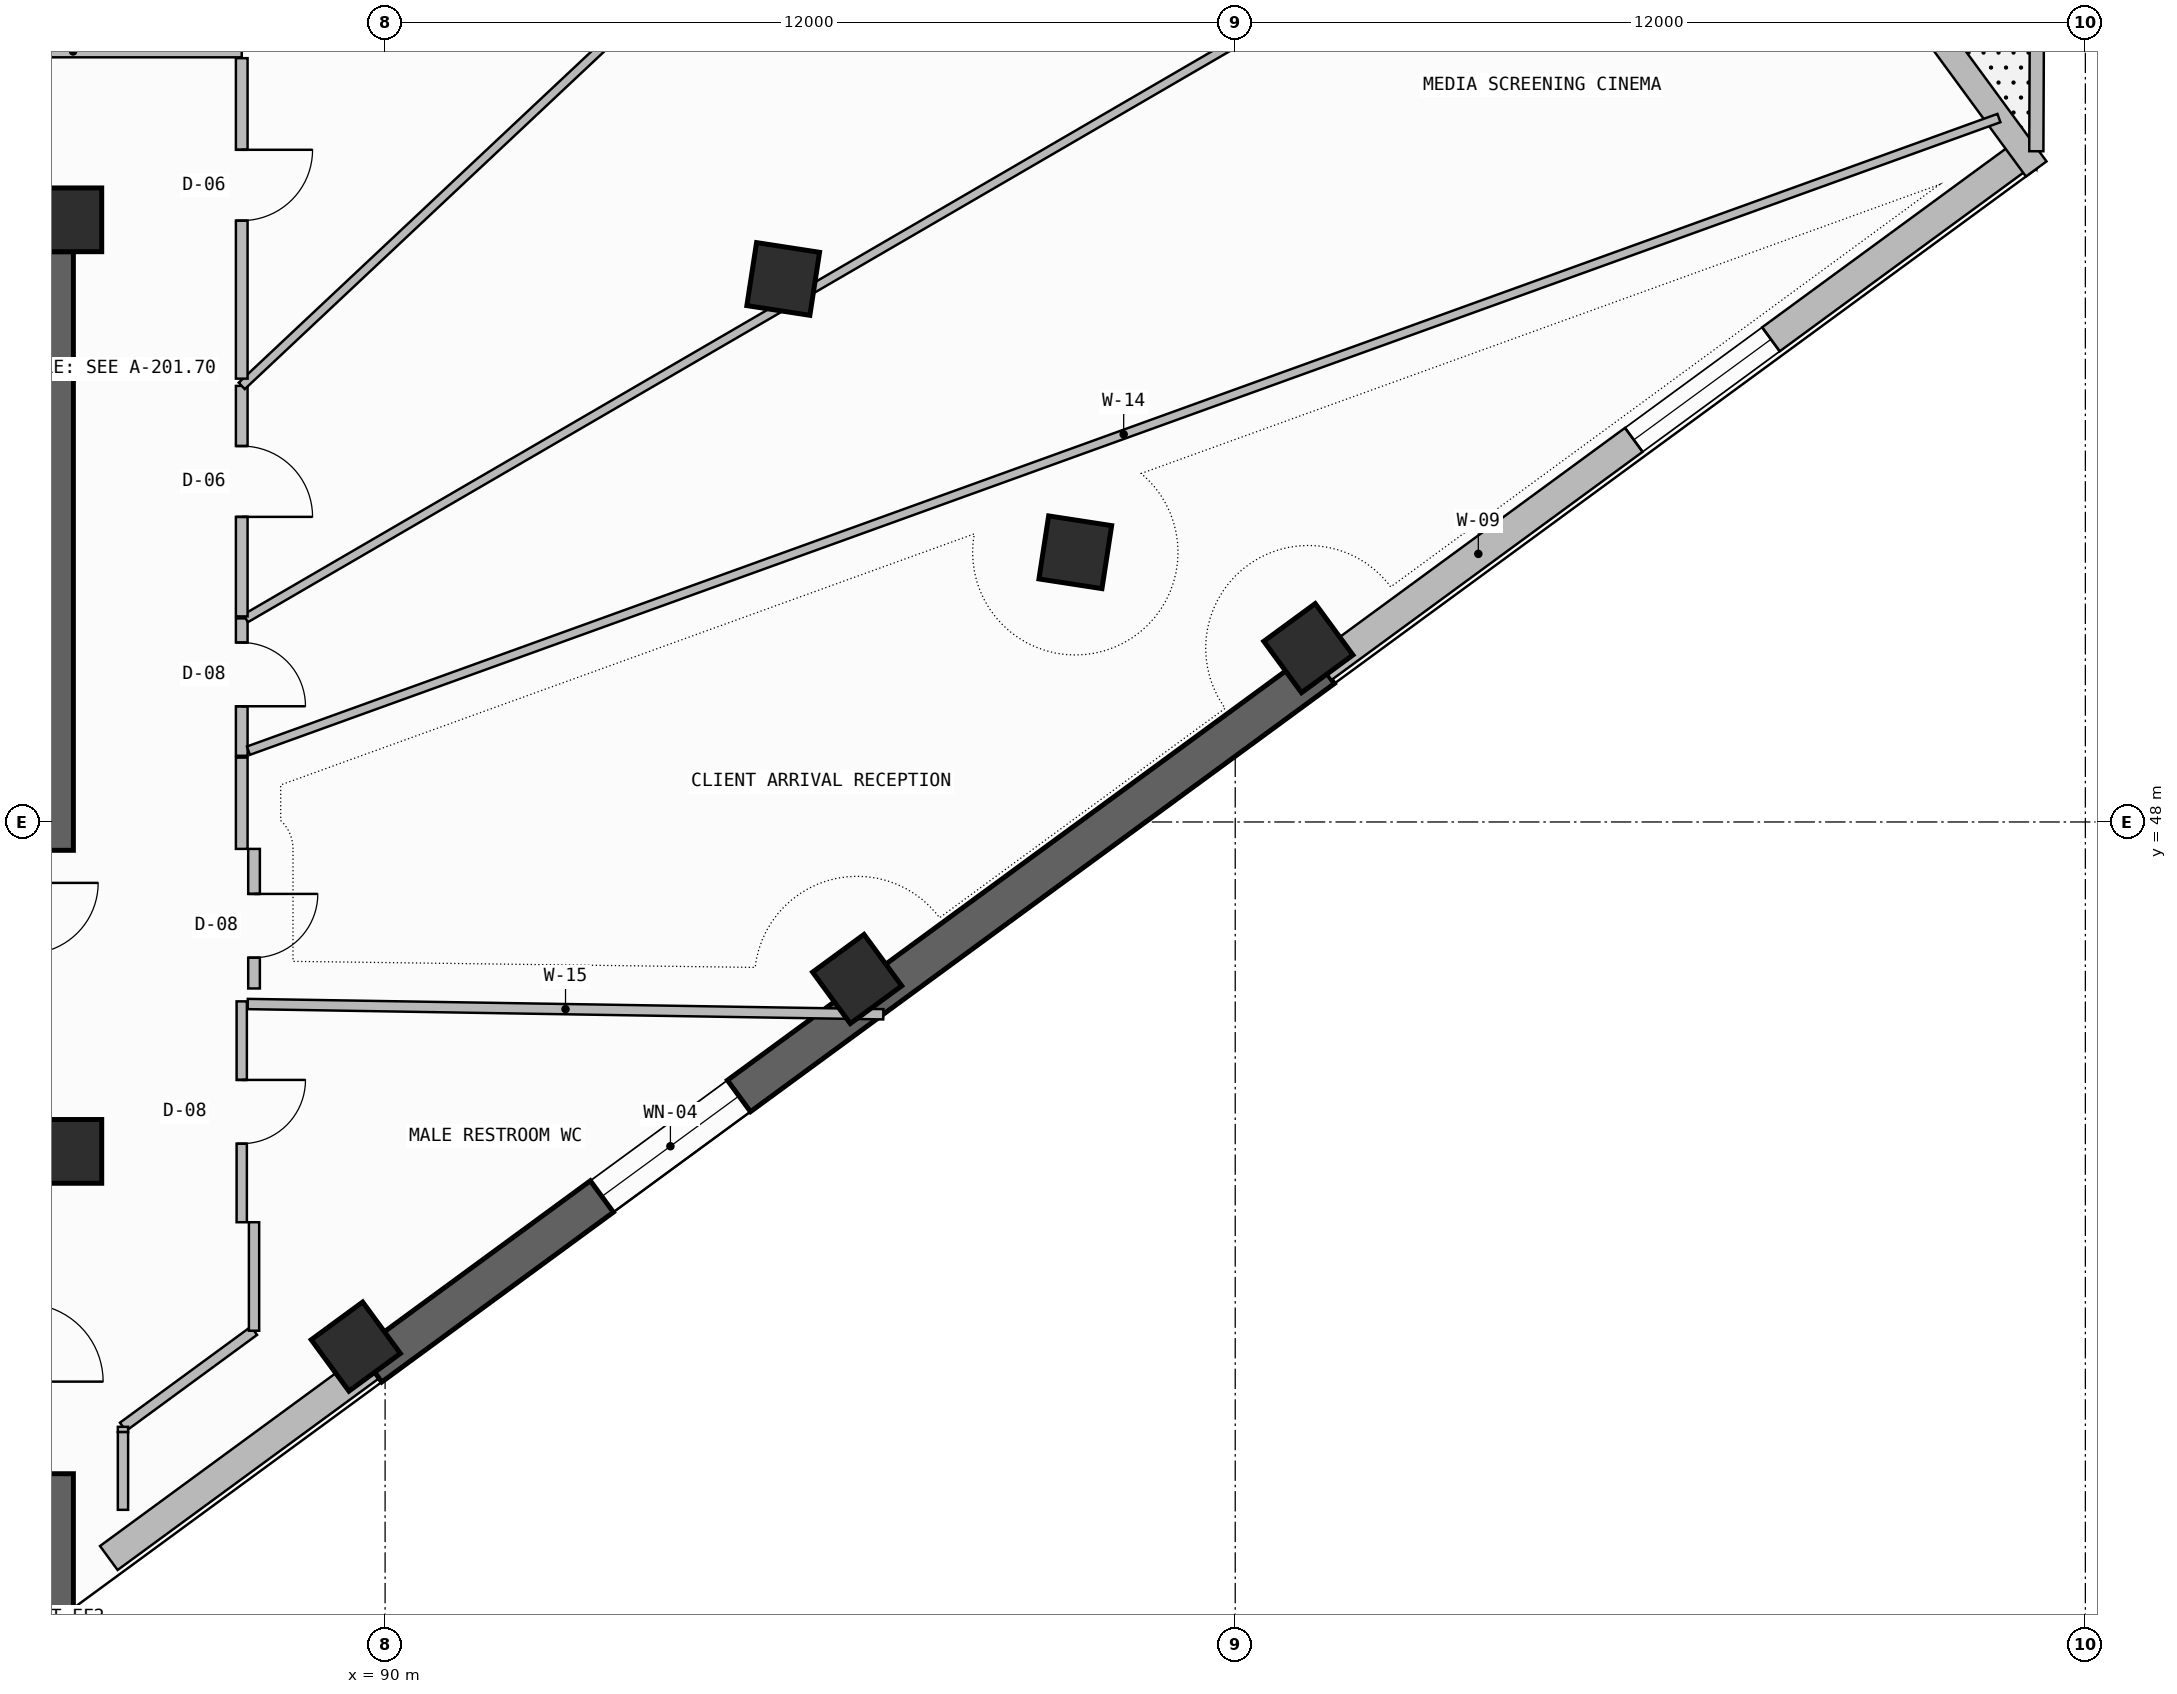
"""IFC4 building model, lengths in metres.
Left out: names, types, materials, properties, quantities, classifications, styles, units other than length and angle.
Written with IfcOpenShell. Run it as: python <this file> out.ifc"""

import sys

from ifc_helpers import new_model, si_unit, direction, frame, frame_2d, origin, origin_2d, place, context, subcontext, project, spatial, rectangle, extrude, element, fill, save


model = new_model("IFC4")
c1 = context("Model", 3, precision=1e-05, world=origin(), true_north=direction((0.0, 1.0)))
c2 = subcontext(c1, "Body", "Model", "MODEL_VIEW")
j1 = project(units=[si_unit("LENGTHUNIT", "METRE"), si_unit("PLANEANGLEUNIT", "RADIAN")], contexts=[c1])
p1 = place(None, origin())
s1 = spatial("IfcSite", under=j1, at=p1, CompositionType="ELEMENT")
p2 = place(p1, origin())
s2 = spatial("IfcBuilding", under=s1, at=p2, CompositionType="ELEMENT")
p3 = place(p2, frame((0.0, 0.0, 250.18)))
s3 = spatial("IfcBuildingStorey", under=s2, at=p3, CompositionType="ELEMENT", Elevation=250.18)
p4 = place(p3, frame((85.3, 35.5, -0.26), z_axis=(0.0, 0.0, 1.0), x_axis=(0.0, 1.0, 0.0)))
e1 = element("IfcWall", 1, at=p4, inside=s3, PredefinedType="SHEAR", context=c2, shape_type="SweptSolid", body=[
    extrude(rectangle(XDim=3.3, YDim=0.6, at=frame_2d((1.65, 0.0))), origin(), (0.0, 0.0, 1.0), 3.52),
])
p5 = place(p3, frame((72.0, 56.35, -0.26), z_axis=(0.0, 0.0, 1.0), x_axis=(1.0, 0.0, 0.0)))
e2 = element("IfcWall", 2, at=p5, inside=s3, PredefinedType="SHEAR", context=c2, shape_type="SweptSolid", body=[
    extrude(rectangle(XDim=13.6, YDim=0.6, at=frame_2d((6.8, 0.0))), origin(), (0.0, 0.0, 1.0), 3.52),
])
p6 = place(p3, frame((85.3, 47.6, -0.26), z_axis=(0.0, 0.0, 1.0), x_axis=(0.0, 1.0, 0.0)))
e3 = element("IfcWall", 3, at=p6, inside=s3, PredefinedType="SHEAR", context=c2, shape_type="SweptSolid", body=[
    extrude(rectangle(XDim=8.45, YDim=0.6, at=frame_2d((4.225, 0.0))), origin(), (0.0, 0.0, 1.0), 3.52),
])
for number, where, z_axis, x_axis in (
    (4, (85.55, 43.35, 0.0), (0.0, 0.0, 1.0), (1.0, 0.0, 0.0)),
    (5, (85.55, 56.5, 0.0), (0.0, 0.0, 1.0), (1.0, 0.0, 0.0)),
    (6, (89.586, 40.594, 0.0), (0.0, 0.0, 1.0), (0.806, 0.591, 0.0)),
    (7, (96.663, 45.783, 0.0), (0.0, 0.0, 1.0), (0.806, 0.591, 0.0)),
    (8, (103.032, 50.454, 0.0), (0.0, 0.0, 1.0), (0.806, 0.591, 0.0)),
    (9, (99.743, 51.807, 0.0), (0.0, 0.0, 1.0), (0.152, 0.988, 0.0)),
    (10, (95.619, 55.665, 0.0), (0.0, 0.0, 1.0), (0.152, 0.988, 0.0)),
):
    element("IfcColumn", number, at=place(p3, frame(where, z_axis=z_axis, x_axis=x_axis)), inside=s3, PredefinedType="COLUMN", context=c2, shape_type="SweptSolid", body=[
        extrude(rectangle(XDim=0.9, YDim=0.9, at=origin_2d()), origin(), (0.0, 0.0, 1.0), 3.52),
    ])
p7 = place(p3, frame((86.1, 37.61, 0.0), z_axis=(0.0, 0.0, 1.0), x_axis=(0.806432132361, 0.591326657521, 0.0)))
e11 = element("IfcWall", 11, at=p7, inside=s3, PredefinedType="SOLIDWALL", context=c2, shape_type="SweptSolid", body=[
    extrude(rectangle(XDim=4.576, YDim=0.42, at=frame_2d((2.288, 0.0))), origin(), (0.0, 0.0, 1.0), 2.245),
])
p8 = place(p3, frame((89.791, 40.316, -0.26), z_axis=(0.0, 0.0, 1.0), x_axis=(0.806449218078, 0.591303355868, 0.0)))
e12 = element("IfcWall", 12, at=p8, inside=s3, PredefinedType="SHEAR", context=c2, shape_type="SweptSolid", body=[
    extrude(rectangle(XDim=16.673, YDim=0.55, at=frame_2d((8.336, 0.0))), origin(), (0.0, 0.0, 1.0), 3.52),
])
p9 = place(p8, frame((4.054, 0.0, 1.1)))
e13 = element("IfcOpeningElement", 13, at=p9, cuts=e12, PredefinedType="OPENING", context=c2, shape_type="SweptSolid", body=[
    extrude(rectangle(XDim=2.4, YDim=1.2, at=frame_2d((1.2, 0.6))), frame((0.0, 0.285, 0.0), z_axis=(0.0, -1.0, 0.0), x_axis=(1.0, 0.0, 0.0)), (0.0, 0.0, 1.0), 0.57),
])
p10 = place(p3, frame((103.237, 50.175, 0.0), z_axis=(0.0, 0.0, 1.0), x_axis=(0.80643721533, 0.591319725471, 0.0)))
e14 = element("IfcWall", 14, at=p10, inside=s3, PredefinedType="SOLIDWALL", context=c2, shape_type="SweptSolid", body=[
    extrude(rectangle(XDim=12.285, YDim=0.42, at=frame_2d((6.143, 0.0))), origin(), (0.0, 0.0, 1.0), 2.245),
])
p11 = place(p10, frame((5.443, 0.0, 0.965)))
e15 = element("IfcOpeningElement", 15, at=p11, cuts=e14, PredefinedType="OPENING", context=c2, shape_type="SweptSolid", body=[
    extrude(rectangle(XDim=2.4, YDim=1.2, at=frame_2d((1.2, 0.6))), frame((0.0, 0.22, 0.0), z_axis=(0.0, -1.0, 0.0), x_axis=(1.0, 0.0, 0.0)), (0.0, 0.0, 1.0), 0.44),
])
p12 = place(p3, frame((113.307, 57.218, 0.0), z_axis=(0.0, 0.0, 1.0), x_axis=(-0.591251685745, 0.806487101015, 0.0)))
e16 = element("IfcWall", 16, at=p12, inside=s3, PredefinedType="SOLIDWALL", context=c2, shape_type="SweptSolid", body=[
    extrude(rectangle(XDim=2.269, YDim=0.36, at=frame_2d((1.134, 0.0))), origin(), (0.0, 0.0, 1.0), 3.26),
])
p13 = place(p3, frame((113.308, 57.468, 0.0), z_axis=(0.0, 0.0, 1.0), x_axis=(0.004415432147, 0.999990251932, 0.0)))
e17 = element("IfcWall", 17, at=p13, inside=s3, PredefinedType="PARAPET", context=c2, shape_type="SweptSolid", body=[
    extrude(rectangle(XDim=2.322, YDim=0.2, at=frame_2d((1.161, 0.0))), origin(), (0.0, 0.0, 1.0), 1.15),
])
p14 = place(p3, frame((87.976, 42.35, 0.0), z_axis=(0.0, 0.0, 1.0), x_axis=(0.0, 1.0, 0.0)))
e18 = element("IfcWall", 18, at=p14, inside=s3, PredefinedType="PARTITIONING", context=c2, shape_type="SweptSolid", body=[
    extrude(rectangle(XDim=3.118, YDim=0.145, at=frame_2d((1.559, 0.0))), origin(), (0.0, 0.0, 1.0), 2.745),
])
p15 = place(p14, frame((1.109, 0.0, 0.0)))
e19 = element("IfcOpeningElement", 19, at=p15, cuts=e18, PredefinedType="OPENING", context=c2, shape_type="SweptSolid", body=[
    extrude(rectangle(XDim=0.9, YDim=2.1, at=frame_2d((0.45, 1.05))), frame((0.0, 0.083, 0.0), z_axis=(0.0, -1.0, 0.0), x_axis=(1.0, 0.0, 0.0)), (0.0, 0.0, 1.0), 0.165),
])
p16 = place(p3, frame((86.3, 39.462, 0.0), z_axis=(0.0, 0.0, 1.0), x_axis=(0.80642868075, 0.591331364689, 0.0)))
e20 = element("IfcWall", 20, at=p16, inside=s3, PredefinedType="PARTITIONING", context=c2, shape_type="SweptSolid", body=[
    extrude(rectangle(XDim=2.294, YDim=0.145, at=frame_2d((1.147, 0.0))), origin(), (0.0, 0.0, 1.0), 3.26),
])
p17 = place(p3, frame((88.15, 40.818, 0.0), z_axis=(0.0, 0.0, 1.0), x_axis=(0.0, 1.0, 0.0)))
e21 = element("IfcWall", 21, at=p17, inside=s3, PredefinedType="PARTITIONING", context=c2, shape_type="SweptSolid", body=[
    extrude(rectangle(XDim=1.532, YDim=0.145, at=frame_2d((0.766, 0.0))), origin(), (0.0, 0.0, 1.0), 2.745),
])
p18 = place(p3, frame((86.3, 39.388, 0.0), z_axis=(0.0, 0.0, 1.0), x_axis=(0.0, 1.0, 0.0)))
e22 = element("IfcWall", 22, at=p18, inside=s3, PredefinedType="PARTITIONING", context=c2, shape_type="SweptSolid", body=[
    extrude(rectangle(XDim=0.074, YDim=0.145, at=frame_2d((0.037, 0.0))), origin(), (0.0, 0.0, 1.0), 3.26),
])
p19 = place(p3, frame((88.061, 45.43, 0.0), z_axis=(0.0, 0.0, 1.0), x_axis=(0.99986939291, -0.01616159404, 0.0)))
e23 = element("IfcWall", 23, at=p19, inside=s3, PredefinedType="PARTITIONING", context=c2, shape_type="SweptSolid", body=[
    extrude(rectangle(XDim=8.973, YDim=0.145, at=frame_2d((4.487, 0.0))), origin(), (0.0, 0.0, 1.0), 2.245),
])
p20 = place(p3, frame((87.976, 48.934, 0.0), z_axis=(0.0, 0.0, 1.0), x_axis=(0.0, 1.0, 0.0)))
e24 = element("IfcWall", 24, at=p20, inside=s3, PredefinedType="PARTITIONING", context=c2, shape_type="SweptSolid", body=[
    extrude(rectangle(XDim=1.94, YDim=0.165, at=frame_2d((0.97, 0.0))), origin(), (0.0, 0.0, 1.0), 3.26),
])
p21 = place(p20, frame((0.699, 0.0, 0.0)))
e25 = element("IfcOpeningElement", 25, at=p21, cuts=e24, PredefinedType="OPENING", context=c2, shape_type="SweptSolid", body=[
    extrude(rectangle(XDim=0.9, YDim=2.1, at=frame_2d((0.45, 1.05))), frame((0.0, 0.093, 0.0), z_axis=(0.0, -1.0, 0.0), x_axis=(1.0, 0.0, 0.0)), (0.0, 0.0, 1.0), 0.185),
])
p22 = place(p3, frame((112.78, 57.937, 0.0), z_axis=(0.0, 0.0, 1.0), x_axis=(-0.940468773031, -0.339880106734, 0.0)))
e26 = element("IfcWall", 26, at=p22, inside=s3, PredefinedType="PARTITIONING", context=c2, shape_type="SweptSolid", body=[
    extrude(rectangle(XDim=26.273, YDim=0.125, at=frame_2d((13.136, 0.0))), origin(), (0.0, 0.0, 1.0), 2.645),
])
p23 = place(p3, frame((88.032, 50.874, 0.0), z_axis=(0.0, 0.0, 1.0), x_axis=(0.864436485223, 0.502742044209, 0.0)))
e27 = element("IfcWall", 27, at=p23, inside=s3, PredefinedType="PARTITIONING", context=c2, shape_type="SweptSolid", body=[
    extrude(rectangle(XDim=20.485, YDim=0.125, at=frame_2d((10.243, 0.0))), origin(), (0.0, 0.0, 1.0), 2.645),
])
p24 = place(p3, frame((88.15, 45.65, 0.0), z_axis=(0.0, 0.0, 1.0), x_axis=(0.0, 1.0, 0.0)))
e28 = element("IfcWall", 28, at=p24, inside=s3, PredefinedType="PARTITIONING", context=c2, shape_type="SweptSolid", body=[
    extrude(rectangle(XDim=1.97, YDim=0.165, at=frame_2d((0.985, 0.0))), origin(), (0.0, 0.0, 1.0), 3.26),
])
p25 = place(p24, frame((0.435, 0.0, 0.0)))
e29 = element("IfcOpeningElement", 29, at=p25, cuts=e28, PredefinedType="OPENING", context=c2, shape_type="SweptSolid", body=[
    extrude(rectangle(XDim=0.9, YDim=2.1, at=frame_2d((0.45, 1.05))), frame((0.0, 0.093, 0.0), z_axis=(0.0, -1.0, 0.0), x_axis=(1.0, 0.0, 0.0)), (0.0, 0.0, 1.0), 0.185),
])
p26 = place(p3, frame((87.976, 47.62, 0.0), z_axis=(0.0, 0.0, 1.0), x_axis=(0.0, 1.0, 0.0)))
e30 = element("IfcWall", 30, at=p26, inside=s3, PredefinedType="PARTITIONING", context=c2, shape_type="SweptSolid", body=[
    extrude(rectangle(XDim=1.289, YDim=0.165, at=frame_2d((0.644, 0.0))), origin(), (0.0, 0.0, 1.0), 3.26),
])
p27 = place(p3, frame((87.976, 50.902, 0.0), z_axis=(0.0, 0.0, 1.0), x_axis=(0.0, 1.0, 0.0)))
e31 = element("IfcWall", 31, at=p27, inside=s3, PredefinedType="PARTITIONING", context=c2, shape_type="SweptSolid", body=[
    extrude(rectangle(XDim=3.254, YDim=0.165, at=frame_2d((1.627, 0.0))), origin(), (0.0, 0.0, 1.0), 3.26),
])
p28 = place(p27, frame((1.405, 0.0, 0.0)))
e32 = element("IfcOpeningElement", 32, at=p28, cuts=e31, PredefinedType="OPENING", context=c2, shape_type="SweptSolid", body=[
    extrude(rectangle(XDim=1.0, YDim=2.2, at=frame_2d((0.5, 1.1))), frame((0.0, 0.093, 0.0), z_axis=(0.0, -1.0, 0.0), x_axis=(1.0, 0.0, 0.0)), (0.0, 0.0, 1.0), 0.185),
])
p29 = place(p3, frame((87.976, 54.156, 0.0), z_axis=(0.0, 0.0, 1.0), x_axis=(0.72887582032, 0.68464592203, 0.0)))
e33 = element("IfcWall", 33, at=p29, inside=s3, PredefinedType="PARTITIONING", context=c2, shape_type="SweptSolid", body=[
    extrude(rectangle(XDim=11.575, YDim=0.125, at=frame_2d((5.788, 0.0))), origin(), (0.0, 0.0, 1.0), 2.645),
])
p30 = place(p3, frame((87.976, 58.876, 0.0), z_axis=(0.0, 0.0, 1.0), x_axis=(-1.0, 0.0, 0.0)))
e34 = element("IfcWall", 34, at=p30, inside=s3, PredefinedType="PARTITIONING", context=c2, shape_type="SweptSolid", body=[
    extrude(rectangle(XDim=4.76, YDim=0.165, at=frame_2d((2.38, 0.0))), origin(), (0.0, 0.0, 1.0), 2.745),
])
p31 = place(p3, frame((87.976, 54.258, 0.0), z_axis=(0.0, 0.0, 1.0), x_axis=(0.0, 1.0, 0.0)))
e35 = element("IfcWall", 35, at=p31, inside=s3, PredefinedType="PARTITIONING", context=c2, shape_type="SweptSolid", body=[
    extrude(rectangle(XDim=4.524, YDim=0.165, at=frame_2d((2.262, 0.0))), origin(), (0.0, 0.0, 1.0), 2.745),
])
p32 = place(p31, frame((2.231, 0.0, 0.0)))
e36 = element("IfcOpeningElement", 36, at=p32, cuts=e35, PredefinedType="OPENING", context=c2, shape_type="SweptSolid", body=[
    extrude(rectangle(XDim=1.0, YDim=2.2, at=frame_2d((0.5, 1.1))), frame((0.0, 0.093, 0.0), z_axis=(0.0, -1.0, 0.0), x_axis=(1.0, 0.0, 0.0)), (0.0, 0.0, 1.0), 0.185),
])
p33 = place(p3, frame((86.3, 38.29, 0.0), z_axis=(0.0, 0.0, 1.0), x_axis=(0.0, 1.0, 0.0)))
e37 = element("IfcWall", 37, at=p33, inside=s3, PredefinedType="PARTITIONING", context=c2, shape_type="SweptSolid", body=[
    extrude(rectangle(XDim=1.097, YDim=0.145, at=frame_2d((0.549, 0.0))), origin(), (0.0, 0.0, 1.0), 3.26),
])
p34 = place(p9, origin())
e38 = element("IfcWindow", 38, at=p34, inside=s3, PartitioningType="SINGLE_PANEL", PredefinedType="WINDOW", context=c2, shape_type="SweptSolid", body=[
    extrude(rectangle(XDim=2.4, YDim=1.2, at=frame_2d((1.2, 0.6))), frame((0.0, 0.03, 0.0), z_axis=(0.0, -1.0, 0.0), x_axis=(1.0, 0.0, 0.0)), (0.0, 0.0, 1.0), 0.06),
])
fill(e13, e38)
p35 = place(p11, origin())
e39 = element("IfcWindow", 39, at=p35, inside=s3, PartitioningType="SINGLE_PANEL", PredefinedType="WINDOW", context=c2, shape_type="SweptSolid", body=[
    extrude(rectangle(XDim=2.4, YDim=1.2, at=frame_2d((1.2, 0.6))), frame((0.0, 0.03, 0.0), z_axis=(0.0, -1.0, 0.0), x_axis=(1.0, 0.0, 0.0)), (0.0, 0.0, 1.0), 0.06),
])
fill(e15, e39)
p36 = place(p15, frame((0.9, 0.0, 0.0), z_axis=(0.0, 0.0, 1.0), x_axis=(-1.0, 0.0, 0.0)))
e40 = element("IfcDoor", 40, at=p36, inside=s3, OperationType="SINGLE_SWING_LEFT", PredefinedType="DOOR", context=c2, shape_type="SweptSolid", body=[
    extrude(rectangle(XDim=0.9, YDim=2.1, at=frame_2d((0.45, 1.05))), frame((0.0, 0.025, 0.0), z_axis=(0.0, -1.0, 0.0), x_axis=(1.0, 0.0, 0.0)), (0.0, 0.0, 1.0), 0.05),
])
fill(e19, e40)
p37 = place(p21, frame((0.9, 0.0, 0.0), z_axis=(0.0, 0.0, 1.0), x_axis=(-1.0, 0.0, 0.0)))
e41 = element("IfcDoor", 41, at=p37, inside=s3, OperationType="SINGLE_SWING_RIGHT", PredefinedType="DOOR", context=c2, shape_type="SweptSolid", body=[
    extrude(rectangle(XDim=0.9, YDim=2.1, at=frame_2d((0.45, 1.05))), frame((0.0, 0.025, 0.0), z_axis=(0.0, -1.0, 0.0), x_axis=(1.0, 0.0, 0.0)), (0.0, 0.0, 1.0), 0.05),
])
fill(e25, e41)
p38 = place(p25, frame((0.9, 0.0, 0.0), z_axis=(0.0, 0.0, 1.0), x_axis=(-1.0, 0.0, 0.0)))
e42 = element("IfcDoor", 42, at=p38, inside=s3, OperationType="SINGLE_SWING_LEFT", PredefinedType="DOOR", context=c2, shape_type="SweptSolid", body=[
    extrude(rectangle(XDim=0.9, YDim=2.1, at=frame_2d((0.45, 1.05))), frame((0.0, 0.025, 0.0), z_axis=(0.0, -1.0, 0.0), x_axis=(1.0, 0.0, 0.0)), (0.0, 0.0, 1.0), 0.05),
])
fill(e29, e42)
p39 = place(p28, frame((1.0, 0.0, 0.0), z_axis=(0.0, 0.0, 1.0), x_axis=(-1.0, 0.0, 0.0)))
e43 = element("IfcDoor", 43, at=p39, inside=s3, OperationType="SINGLE_SWING_RIGHT", PredefinedType="DOOR", context=c2, shape_type="SweptSolid", body=[
    extrude(rectangle(XDim=1.0, YDim=2.2, at=frame_2d((0.5, 1.1))), frame((0.0, 0.025, 0.0), z_axis=(0.0, -1.0, 0.0), x_axis=(1.0, 0.0, 0.0)), (0.0, 0.0, 1.0), 0.05),
])
fill(e32, e43)
p40 = place(p32, frame((1.0, 0.0, 0.0), z_axis=(0.0, 0.0, 1.0), x_axis=(-1.0, 0.0, 0.0)))
e44 = element("IfcDoor", 44, at=p40, inside=s3, OperationType="SINGLE_SWING_LEFT", PredefinedType="DOOR", context=c2, shape_type="SweptSolid", body=[
    extrude(rectangle(XDim=1.0, YDim=2.2, at=frame_2d((0.5, 1.1))), frame((0.0, 0.025, 0.0), z_axis=(0.0, -1.0, 0.0), x_axis=(1.0, 0.0, 0.0)), (0.0, 0.0, 1.0), 0.05),
])
fill(e36, e44)
save(model, sys.argv[1])
